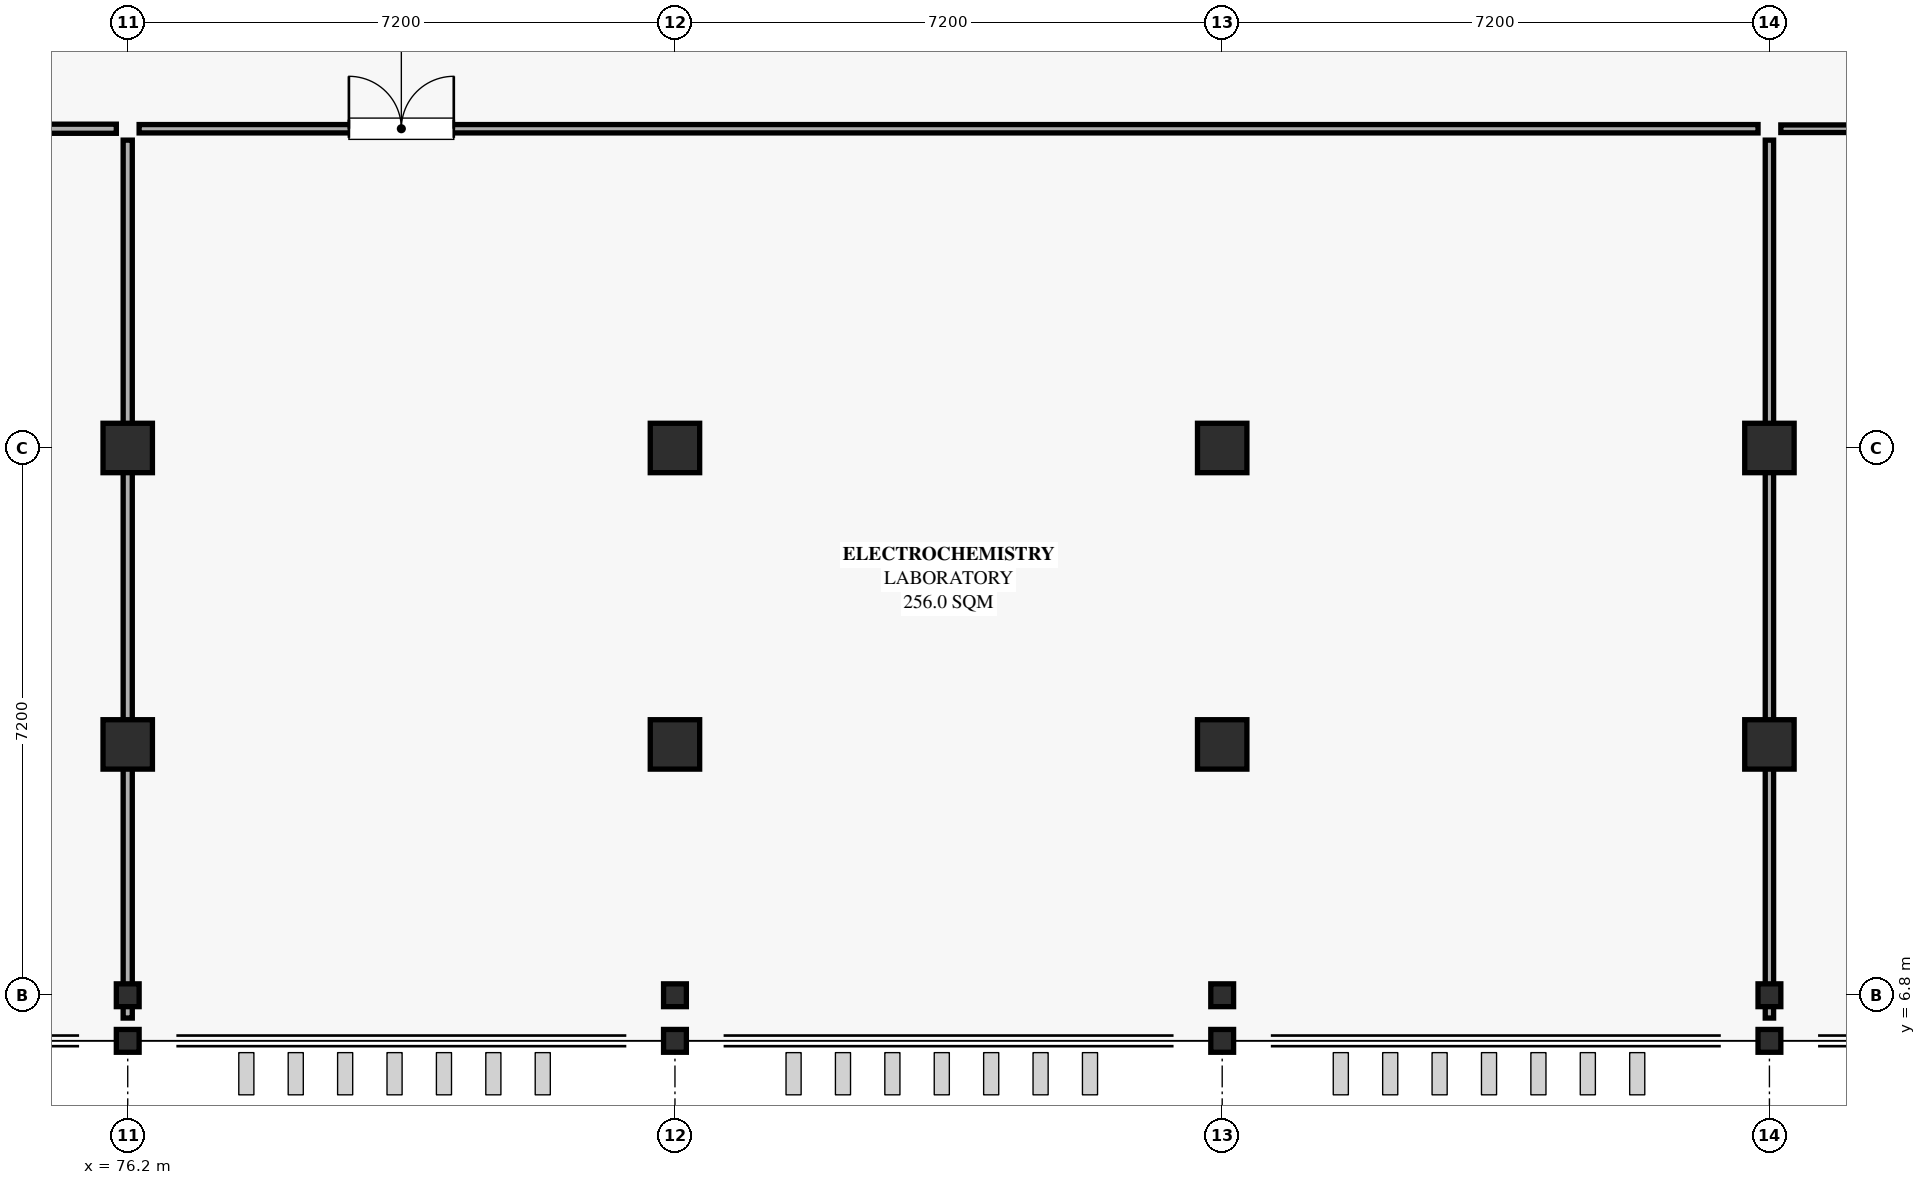
"""IFC4 building model, lengths in metres.
Left out: names, types, materials, properties, quantities, classifications, styles, units other than length and angle.
Written with IfcOpenShell. Run it as: python <this file> out.ifc"""

import sys

from ifc_helpers import new_model, si_unit, direction, frame, frame_2d, origin, origin_2d, place, context, subcontext, project, spatial, rectangle, hollow_rectangle, extrude, element, fill, save


model = new_model("IFC4")
c1 = context("Model", 3, precision=1e-05, world=origin(), true_north=direction((0.0, 1.0)))
c2 = subcontext(c1, "Body", "Model", "MODEL_VIEW")
j1 = project(units=[si_unit("LENGTHUNIT", "METRE"), si_unit("PLANEANGLEUNIT", "RADIAN")], contexts=[c1])
p1 = place(None, origin())
s1 = spatial("IfcSite", under=j1, at=p1, CompositionType="ELEMENT")
p2 = place(p1, origin())
s2 = spatial("IfcBuilding", under=s1, at=p2, CompositionType="ELEMENT")
p3 = place(p2, frame((0.0, 0.0, 28.8)))
s3 = spatial("IfcBuildingStorey", under=s2, at=p3, CompositionType="ELEMENT", Elevation=28.8)
for number, where, z_axis, x_axis in (
    (1, (76.2, 6.2, 0.0), (0.0, 0.0, 1.0), (1.0, 0.0, 0.0)),
    (2, (83.4, 6.2, 0.0), (0.0, 0.0, 1.0), (1.0, 0.0, 0.0)),
    (3, (90.6, 6.2, 0.0), (0.0, 0.0, 1.0), (1.0, 0.0, 0.0)),
    (4, (97.8, 6.2, 0.0), (0.0, 0.0, 1.0), (1.0, 0.0, 0.0)),
    (5, (76.2, 6.8, 0.0), (0.0, 0.0, 1.0), (1.0, 0.0, 0.0)),
    (6, (83.4, 6.8, 0.0), (0.0, 0.0, 1.0), (1.0, 0.0, 0.0)),
    (7, (90.6, 6.8, 0.0), (0.0, 0.0, 1.0), (1.0, 0.0, 0.0)),
    (8, (97.8, 6.8, 0.0), (0.0, 0.0, 1.0), (1.0, 0.0, 0.0)),
):
    element("IfcColumn", number, at=place(p3, frame(where, z_axis=z_axis, x_axis=x_axis)), inside=s3, PredefinedType="COLUMN", context=c2, shape_type="SweptSolid", body=[
        extrude(hollow_rectangle(XDim=0.3, YDim=0.3, WallThickness=0.012, InnerFilletRadius=0.018, OuterFilletRadius=0.03, at=origin_2d()), origin(), (0.0, 0.0, 1.0), 4.5),
    ])
for number, where, z_axis, x_axis in (
    (9, (76.2, 10.1, 0.0), (0.0, 0.0, 1.0), (1.0, 0.0, 0.0)),
    (10, (83.4, 10.1, 0.0), (0.0, 0.0, 1.0), (1.0, 0.0, 0.0)),
    (11, (90.6, 10.1, 0.0), (0.0, 0.0, 1.0), (1.0, 0.0, 0.0)),
    (12, (97.8, 10.1, 0.0), (0.0, 0.0, 1.0), (1.0, 0.0, 0.0)),
    (13, (76.2, 14.0, 0.0), (0.0, 0.0, 1.0), (1.0, 0.0, 0.0)),
    (14, (83.4, 14.0, 0.0), (0.0, 0.0, 1.0), (1.0, 0.0, 0.0)),
    (15, (90.6, 14.0, 0.0), (0.0, 0.0, 1.0), (1.0, 0.0, 0.0)),
    (16, (97.8, 14.0, 0.0), (0.0, 0.0, 1.0), (1.0, 0.0, 0.0)),
):
    element("IfcColumn", number, at=place(p3, frame(where, z_axis=z_axis, x_axis=x_axis)), inside=s3, PredefinedType="COLUMN", context=c2, shape_type="SweptSolid", body=[
        extrude(rectangle(XDim=0.65, YDim=0.65, at=origin_2d()), origin(), (0.0, 0.0, 1.0), 4.5),
    ])
p4 = place(p3, frame((54.95, 18.2, 0.0), z_axis=(0.0, 0.0, 1.0), x_axis=(1.0, 0.0, 0.0)))
e17 = element("IfcWall", 17, at=p4, inside=s3, PredefinedType="PARTITIONING", context=c2, shape_type="SweptSolid", body=[
    extrude(rectangle(XDim=21.1, YDim=0.12, at=frame_2d((10.55, 0.0))), origin(), (0.0, 0.0, 1.0), 2.98),
])
p5 = place(p4, frame((2.59, 0.0, 0.0)))
e18 = element("IfcOpeningElement", 18, at=p5, cuts=e17, PredefinedType="OPENING", context=c2, shape_type="SweptSolid", body=[
    extrude(rectangle(XDim=1.32, YDim=2.22, at=frame_2d((0.66, 1.11))), frame((0.0, 0.07, 0.0), z_axis=(0.0, -1.0, 0.0), x_axis=(1.0, 0.0, 0.0)), (0.0, 0.0, 1.0), 0.14),
])
p6 = place(p3, frame((76.2, 18.05, 0.0), z_axis=(0.0, 0.0, 1.0), x_axis=(0.0, -1.0, 0.0)))
e19 = element("IfcWall", 19, at=p6, inside=s3, PredefinedType="PARTITIONING", context=c2, shape_type="SweptSolid", body=[
    extrude(rectangle(XDim=11.55, YDim=0.12, at=frame_2d((5.775, 0.0))), origin(), (0.0, 0.0, 1.0), 2.98),
])
p7 = place(p3, frame((76.35, 18.2, 0.0), z_axis=(0.0, 0.0, 1.0), x_axis=(1.0, 0.0, 0.0)))
e20 = element("IfcWall", 20, at=p7, inside=s3, PredefinedType="PARTITIONING", context=c2, shape_type="SweptSolid", body=[
    extrude(rectangle(XDim=21.3, YDim=0.11, at=frame_2d((10.65, 0.0))), origin(), (0.0, 0.0, 1.0), 2.98),
])
p8 = place(p7, frame((2.76, 0.0, 0.0)))
e21 = element("IfcOpeningElement", 21, at=p8, cuts=e20, PredefinedType="OPENING", context=c2, shape_type="SweptSolid", body=[
    extrude(rectangle(XDim=1.38, YDim=2.05, at=frame_2d((0.69, 1.025))), frame((0.0, 0.065, 0.0), z_axis=(0.0, -1.0, 0.0), x_axis=(1.0, 0.0, 0.0)), (0.0, 0.0, 1.0), 0.13),
])
p9 = place(p3, frame((97.8, 18.05, 0.0), z_axis=(0.0, 0.0, 1.0), x_axis=(0.0, -1.0, 0.0)))
e22 = element("IfcWall", 22, at=p9, inside=s3, PredefinedType="PARTITIONING", context=c2, shape_type="SweptSolid", body=[
    extrude(rectangle(XDim=11.55, YDim=0.11, at=frame_2d((5.775, 0.0))), origin(), (0.0, 0.0, 1.0), 2.98),
])
p10 = place(p3, frame((97.95, 18.2, 0.0), z_axis=(0.0, 0.0, 1.0), x_axis=(1.0, 0.0, 0.0)))
e23 = element("IfcWall", 23, at=p10, inside=s3, PredefinedType="PARTITIONING", context=c2, shape_type="SweptSolid", body=[
    extrude(rectangle(XDim=21.1, YDim=0.1, at=frame_2d((10.55, 0.0))), origin(), (0.0, 0.0, 1.0), 2.98),
])
p11 = place(p10, frame((17.16, 0.0, 0.0)))
e24 = element("IfcOpeningElement", 24, at=p11, cuts=e23, PredefinedType="OPENING", context=c2, shape_type="SweptSolid", body=[
    extrude(rectangle(XDim=1.38, YDim=2.1, at=frame_2d((0.69, 1.05))), frame((0.0, 0.06, 0.0), z_axis=(0.0, -1.0, 0.0), x_axis=(1.0, 0.0, 0.0)), (0.0, 0.0, 1.0), 0.12),
])
p12 = place(p8, origin())
e25 = element("IfcDoor", 25, at=p12, inside=s3, OperationType="DOUBLE_DOOR_SINGLE_SWING", PredefinedType="DOOR", context=c2, shape_type="SweptSolid", body=[
    extrude(rectangle(XDim=1.38, YDim=2.05, at=frame_2d((0.69, 1.025))), frame((0.0, 0.025, 0.0), z_axis=(0.0, -1.0, 0.0), x_axis=(1.0, 0.0, 0.0)), (0.0, 0.0, 1.0), 0.05),
])
fill(e21, e25)
save(model, sys.argv[1])
